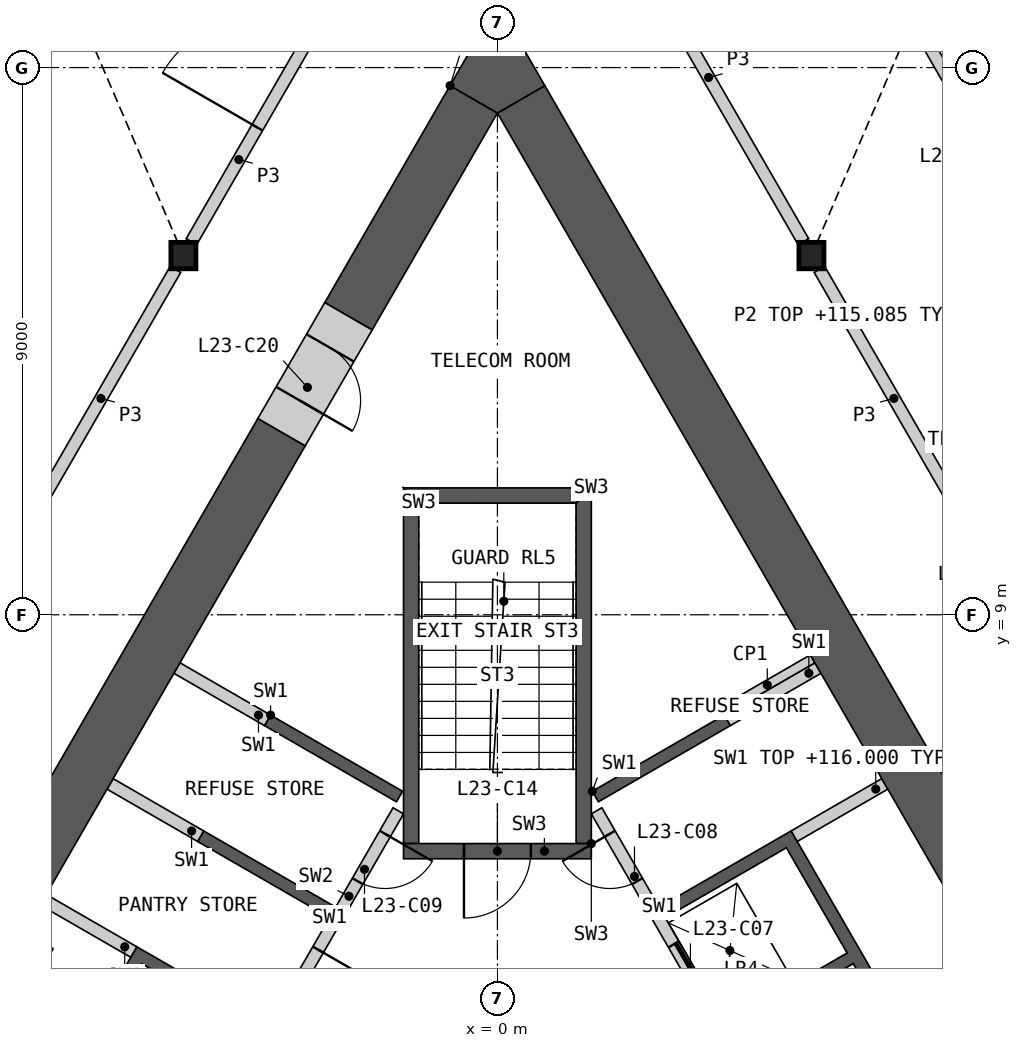
"""IFC4 building model, lengths in metres.
Left out: names, types, materials, properties, quantities, classifications, styles, units other than length and angle.
Written with IfcOpenShell. Run it as: python <this file> out.ifc"""

import sys

from ifc_helpers import new_model, si_unit, direction, frame, frame_2d, origin, origin_2d, place, context, subcontext, project, spatial, polyline, rectangle, i_section, outline, extrude, element, fill, save


model = new_model("IFC4")
c1 = context("Model", 3, precision=1e-05, world=origin(), true_north=direction((0.0, 1.0)))
c2 = subcontext(c1, "Body", "Model", "MODEL_VIEW")
j1 = project(units=[si_unit("LENGTHUNIT", "METRE"), si_unit("PLANEANGLEUNIT", "RADIAN")], contexts=[c1])
p1 = place(None, origin())
s1 = spatial("IfcSite", under=j1, at=p1, CompositionType="ELEMENT")
p2 = place(p1, origin())
s2 = spatial("IfcBuilding", under=s1, at=p2, CompositionType="ELEMENT")
p3 = place(p2, frame((0.0, 0.0, 112.2)))
s3 = spatial("IfcBuildingStorey", under=s2, at=p3, CompositionType="ELEMENT", Elevation=112.2)
for number, where, z_axis, x_axis in (
    (1, (-5.164, 14.908, 0.0), (0.0, 0.0, 1.0), (1.0, 0.0, 0.0)),
    (2, (5.164, 14.908, 0.0), (0.0, 0.0, 1.0), (1.0, 0.0, 0.0)),
):
    element("IfcColumn", number, at=place(p3, frame(where, z_axis=z_axis, x_axis=x_axis)), inside=s3, PredefinedType="COLUMN", context=c2, shape_type="SweptSolid", body=[
        extrude(i_section(OverallWidth=0.412, OverallDepth=0.435, WebThickness=0.036, FlangeThickness=0.057, at=origin_2d()), origin(), (0.0, 0.0, 1.0), 4.2),
    ])
p4 = place(p3, origin())
e3 = element("IfcWall", 3, at=p4, inside=s3, PredefinedType="SHEAR", context=c2, shape_type="SweptSolid", body=[
    extrude(outline(polyline([(1.561, 6.097), (3.731, 7.35), (3.831, 7.177), (1.66, 5.924), (1.561, 6.097)])), origin(), (0.0, 0.0, 1.0), 3.8),
])
p5 = place(p3, origin())
e4 = element("IfcWall", 4, at=p5, inside=s3, PredefinedType="SHEAR", context=c2, shape_type="SweptSolid", body=[
    extrude(outline(polyline([(2.66, 4.192), (4.831, 5.445), (8.231, -0.444), (6.061, -1.697), (5.96, -1.524), (7.952, -0.374), (6.952, 1.358), (4.96, 0.208), (4.861, 0.381), (6.852, 1.531), (5.852, 3.263), (3.861, 2.113), (3.76, 2.287), (5.752, 3.437), (4.752, 5.169), (2.76, 4.019), (2.66, 4.192)])), origin(), (0.0, 0.0, 1.0), 3.8),
])
p6 = place(p3, frame((5.817, -1.476, 0.0), z_axis=(0.0, 0.0, 1.0), x_axis=(-0.500002616675, 0.866023893041, 0.0)))
e5 = element("IfcWall", 5, at=p6, inside=s3, PredefinedType="SOLIDWALL", context=c2, shape_type="SweptSolid", body=[
    extrude(rectangle(XDim=8.373, YDim=0.2, at=frame_2d((4.187, 0.0))), origin(), (0.0, 0.0, 1.0), 3.8),
])
p7 = place(p6, frame((0.337, 0.0, 0.0)))
e6 = element("IfcOpeningElement", 6, at=p7, cuts=e5, PredefinedType="OPENING", context=c2, shape_type="SweptSolid", body=[
    extrude(rectangle(XDim=1.1, YDim=2.1, at=frame_2d((0.55, 1.05))), frame((0.0, 0.11, 0.0), z_axis=(0.0, -1.0, 0.0), x_axis=(1.0, 0.0, 0.0)), (0.0, 0.0, 1.0), 0.22),
])
p8 = place(p6, frame((2.537, 0.0, 0.0)))
e7 = element("IfcOpeningElement", 7, at=p8, cuts=e5, PredefinedType="OPENING", context=c2, shape_type="SweptSolid", body=[
    extrude(rectangle(XDim=1.1, YDim=2.1, at=frame_2d((0.55, 1.05))), frame((0.0, 0.11, 0.0), z_axis=(0.0, -1.0, 0.0), x_axis=(1.0, 0.0, 0.0)), (0.0, 0.0, 1.0), 0.22),
])
p9 = place(p6, frame((4.737, 0.0, 0.0)))
e8 = element("IfcOpeningElement", 8, at=p9, cuts=e5, PredefinedType="OPENING", context=c2, shape_type="SweptSolid", body=[
    extrude(rectangle(XDim=1.1, YDim=2.1, at=frame_2d((0.55, 1.05))), frame((0.0, 0.11, 0.0), z_axis=(0.0, -1.0, 0.0), x_axis=(1.0, 0.0, 0.0)), (0.0, 0.0, 1.0), 0.22),
])
p10 = place(p6, frame((7.037, 0.0, 0.0)))
e9 = element("IfcOpeningElement", 9, at=p10, cuts=e5, PredefinedType="OPENING", context=c2, shape_type="SweptSolid", body=[
    extrude(rectangle(XDim=0.9, YDim=2.1, at=frame_2d((0.45, 1.05))), frame((0.0, 0.11, 0.0), z_axis=(0.0, -1.0, 0.0), x_axis=(1.0, 0.0, 0.0)), (0.0, 0.0, 1.0), 0.22),
])
for number, where, z_axis, x_axis in (
    (10, (4.881, 5.358, 0.0), (0.0, 0.0, 1.0), (0.866, 0.5, 0.0)),
    (11, (3.781, 7.263, 0.0), (0.0, 0.0, 1.0), (0.866, 0.5, 0.0)),
):
    element("IfcWall", number, at=place(p3, frame(where, z_axis=z_axis, x_axis=x_axis)), inside=s3, PredefinedType="SHEAR", context=c2, shape_type="SweptSolid", body=[
        extrude(rectangle(XDim=1.72, YDim=0.2, at=frame_2d((0.86, 0.0))), origin(), (0.0, 0.0, 1.0), 3.8),
    ])
p11 = place(p3, origin())
e12 = element("IfcWall", 12, at=p11, inside=s3, PredefinedType="SHEAR", context=c2, shape_type="SweptSolid", body=[
    extrude(outline(polyline([(-4.96, 0.208), (-7.131, 1.461), (-5.931, 3.54), (-3.76, 2.287), (-3.861, 2.113), (-5.852, 3.263), (-6.852, 1.531), (-4.861, 0.381), (-4.96, 0.208)])), origin(), (0.0, 0.0, 1.0), 3.8),
])
p12 = place(p3, origin())
e13 = element("IfcWall", 13, at=p12, inside=s3, PredefinedType="SHEAR", context=c2, shape_type="SweptSolid", body=[
    extrude(outline(polyline([(-2.76, 4.019), (-4.931, 5.272), (-4.831, 5.445), (-2.66, 4.192), (-2.76, 4.019)])), origin(), (0.0, 0.0, 1.0), 3.8),
])
p13 = place(p3, origin())
e14 = element("IfcWall", 14, at=p13, inside=s3, PredefinedType="SHEAR", context=c2, shape_type="SweptSolid", body=[
    extrude(outline(polyline([(-3.731, 7.35), (-1.561, 6.097), (-1.66, 5.924), (-3.831, 7.177), (-3.731, 7.35)])), origin(), (0.0, 0.0, 1.0), 3.8),
])
p14 = place(p3, frame((-1.631, 5.776, 0.0), z_axis=(0.0, 0.0, 1.0), x_axis=(-0.499992876559, -0.866029516466, 0.0)))
e15 = element("IfcWall", 15, at=p14, inside=s3, PredefinedType="SOLIDWALL", context=c2, shape_type="SweptSolid", body=[
    extrude(rectangle(XDim=6.486, YDim=0.2, at=frame_2d((3.243, 0.0))), origin(), (0.0, 0.0, 1.0), 3.8),
])
p15 = place(p14, frame((0.437, 0.0, 0.0)))
e16 = element("IfcOpeningElement", 16, at=p15, cuts=e15, PredefinedType="OPENING", context=c2, shape_type="SweptSolid", body=[
    extrude(rectangle(XDim=0.9, YDim=2.1, at=frame_2d((0.45, 1.05))), frame((0.0, 0.11, 0.0), z_axis=(0.0, -1.0, 0.0), x_axis=(1.0, 0.0, 0.0)), (0.0, 0.0, 1.0), 0.22),
])
p16 = place(p14, frame((2.637, 0.0, 0.0)))
e17 = element("IfcOpeningElement", 17, at=p16, cuts=e15, PredefinedType="OPENING", context=c2, shape_type="SweptSolid", body=[
    extrude(rectangle(XDim=0.9, YDim=2.1, at=frame_2d((0.45, 1.05))), frame((0.0, 0.11, 0.0), z_axis=(0.0, -1.0, 0.0), x_axis=(1.0, 0.0, 0.0)), (0.0, 0.0, 1.0), 0.22),
])
for number, where, z_axis, x_axis in (
    (18, (-3.781, 7.263, 0.0), (0.0, 0.0, 1.0), (-0.866, 0.5, 0.0)),
    (19, (-4.881, 5.358, 0.0), (0.0, 0.0, 1.0), (-0.866, 0.5, 0.0)),
):
    element("IfcWall", number, at=place(p3, frame(where, z_axis=z_axis, x_axis=x_axis)), inside=s3, PredefinedType="SHEAR", context=c2, shape_type="SweptSolid", body=[
        extrude(rectangle(XDim=1.72, YDim=0.2, at=frame_2d((0.86, 0.0))), origin(), (0.0, 0.0, 1.0), 3.8),
    ])
p17 = place(p3, frame((-5.981, 3.453, 0.0), z_axis=(0.0, 0.0, 1.0), x_axis=(-0.866060346521, 0.499939472521, 0.0)))
e20 = element("IfcWall", 20, at=p17, inside=s3, PredefinedType="SHEAR", context=c2, shape_type="SweptSolid", body=[
    extrude(rectangle(XDim=1.72, YDim=0.2, at=frame_2d((0.86, 0.0))), origin(), (0.0, 0.0, 1.0), 3.8),
])
p18 = place(p3, origin())
e21 = element("IfcWall", 21, at=p18, inside=s3, PredefinedType="SHEAR", context=c2, shape_type="SweptSolid", body=[
    extrude(outline(polyline([(1.544, 5.237), (1.544, 11.087), (1.294, 10.837), (1.294, 5.237), (1.544, 5.237)])), origin(), (0.0, 0.0, 1.0), 3.8),
])
p19 = place(p3, origin())
e22 = element("IfcWall", 22, at=p19, inside=s3, PredefinedType="SHEAR", context=c2, shape_type="SweptSolid", body=[
    extrude(outline(polyline([(1.544, 11.087), (-1.544, 11.087), (-1.294, 10.837), (1.294, 10.837), (1.544, 11.087)])), origin(), (0.0, 0.0, 1.0), 3.8),
])
p20 = place(p3, origin())
e23 = element("IfcWall", 23, at=p20, inside=s3, PredefinedType="SHEAR", context=c2, shape_type="SweptSolid", body=[
    extrude(outline(polyline([(-1.294, 10.837), (-1.544, 11.087), (-1.544, 5.237), (-1.294, 5.237), (-1.294, 10.837)])), origin(), (0.0, 0.0, 1.0), 3.8),
])
p21 = place(p3, frame((1.544, 5.112, 0.0), z_axis=(0.0, 0.0, 1.0), x_axis=(-1.0, 0.0, 0.0)))
e24 = element("IfcWall", 24, at=p21, inside=s3, PredefinedType="SHEAR", context=c2, shape_type="SweptSolid", body=[
    extrude(rectangle(XDim=3.088, YDim=0.25, at=frame_2d((1.544, 0.0))), origin(), (0.0, 0.0, 1.0), 3.8),
])
p22 = place(p21, frame((0.994, 0.0, 0.0)))
e25 = element("IfcOpeningElement", 25, at=p22, cuts=e24, PredefinedType="OPENING", context=c2, shape_type="SweptSolid", body=[
    extrude(rectangle(XDim=1.1, YDim=2.1, at=frame_2d((0.55, 1.05))), frame((0.0, 0.135, 0.0), z_axis=(0.0, -1.0, 0.0), x_axis=(1.0, 0.0, 0.0)), (0.0, 0.0, 1.0), 0.27),
])
p23 = place(p3, frame((3.693, 7.415, 0.0), z_axis=(0.0, 0.0, 1.0), x_axis=(0.866024871741, 0.500000921525, 0.0)))
e26 = element("IfcWall", 26, at=p23, inside=s3, PredefinedType="PARTITIONING", context=c2, shape_type="SweptSolid", body=[
    extrude(rectangle(XDim=1.72, YDim=0.15, at=frame_2d((0.86, 0.0))), origin(), (0.0, 0.0, 1.0), 3.8),
])
p24 = place(p3, frame((7.91, 4.451, 0.0), z_axis=(0.0, 0.0, 1.0), x_axis=(-0.500005799286, 0.866022055539, 0.0)))
e27 = element("IfcWall", 27, at=p24, inside=s3, PredefinedType="SHEAR", context=c2, shape_type="SweptSolid", body=[
    extrude(rectangle(XDim=15.041, YDim=0.9, at=frame_2d((7.521, 0.0))), origin(), (0.0, 0.0, 1.0), 3.8),
])
p25 = place(p3, frame((-3.55, 12.004, 0.0), z_axis=(0.0, 0.0, 1.0), x_axis=(-0.499993245289, -0.866029303583, 0.0)))
e28 = element("IfcWall", 28, at=p25, inside=s3, PredefinedType="SHEAR", context=c2, shape_type="SweptSolid", body=[
    extrude(rectangle(XDim=8.741, YDim=0.9, at=frame_2d((4.37, 0.0))), origin(), (0.0, 0.0, 1.0), 3.8),
])
p26 = place(p3, frame((-0.39, 17.478, 0.0), z_axis=(0.0, 0.0, 1.0), x_axis=(-0.50001992892, -0.866013897511, 0.0)))
e29 = element("IfcWall", 29, at=p26, inside=s3, PredefinedType="SHEAR", context=c2, shape_type="SweptSolid", body=[
    extrude(rectangle(XDim=4.12, YDim=0.9, at=frame_2d((2.06, 0.0))), origin(), (0.0, 0.0, 1.0), 3.8),
])
p27 = place(p3, origin())
e30 = element("IfcWall", 30, at=p27, inside=s3, PredefinedType="SHEAR", context=c2, shape_type="SweptSolid", body=[
    extrude(outline(polyline([(-0.779, 17.703), (0.0, 19.052), (0.779, 17.703), (0.0, 17.253), (-0.779, 17.703)])), origin(), (0.0, 0.0, 1.0), 3.8),
])
p28 = place(p3, frame((-2.45, 13.909, 0.0), z_axis=(0.0, 0.0, 1.0), x_axis=(-0.50002983664, -0.866008176907, 0.0)))
e31 = element("IfcWall", 31, at=p28, inside=s3, PredefinedType="SHEAR", context=c2, shape_type="SweptSolid", body=[
    extrude(rectangle(XDim=2.2, YDim=0.9, at=frame_2d((1.1, 0.0))), origin(), (0.0, 0.0, 1.0), 3.8),
])
p29 = place(p28, frame((0.6, 0.0, 0.0)))
e32 = element("IfcOpeningElement", 32, at=p29, cuts=e31, PredefinedType="OPENING", context=c2, shape_type="SweptSolid", body=[
    extrude(rectangle(XDim=1.0, YDim=2.1, at=frame_2d((0.5, 1.05))), frame((0.0, 0.46, 0.0), z_axis=(0.0, -1.0, 0.0), x_axis=(1.0, 0.0, 0.0)), (0.0, 0.0, 1.0), 0.92),
])
p30 = place(p3, frame((-10.197, 6.19, 0.0), z_axis=(0.0, 0.0, 1.0), x_axis=(0.500012035596, 0.866018454918, 0.0)))
e33 = element("IfcWall", 33, at=p30, inside=s3, PredefinedType="PARTITIONING", context=c2, shape_type="SweptSolid", body=[
    extrude(rectangle(XDim=9.803, YDim=0.2, at=frame_2d((4.902, 0.0))), origin(), (0.0, 0.0, 1.0), 3.8),
])
p31 = place(p30, frame((1.851, 0.0, 0.0)))
e34 = element("IfcOpeningElement", 34, at=p31, cuts=e33, PredefinedType="OPENING", context=c2, shape_type="SweptSolid", body=[
    extrude(rectangle(XDim=1.0, YDim=2.1, at=frame_2d((0.5, 1.05))), frame((0.0, 0.11, 0.0), z_axis=(0.0, -1.0, 0.0), x_axis=(1.0, 0.0, 0.0)), (0.0, 0.0, 1.0), 0.22),
])
p32 = place(p3, frame((5.295, 14.68, 0.0), z_axis=(0.0, 0.0, 1.0), x_axis=(0.500012035596, -0.866018454918, 0.0)))
e35 = element("IfcWall", 35, at=p32, inside=s3, PredefinedType="PARTITIONING", context=c2, shape_type="SweptSolid", body=[
    extrude(rectangle(XDim=9.803, YDim=0.2, at=frame_2d((4.902, 0.0))), origin(), (0.0, 0.0, 1.0), 3.8),
])
p33 = place(p32, frame((4.376, 0.0, 0.0)))
e36 = element("IfcOpeningElement", 36, at=p33, cuts=e35, PredefinedType="OPENING", context=c2, shape_type="SweptSolid", body=[
    extrude(rectangle(XDim=0.95, YDim=2.1, at=frame_2d((0.475, 1.05))), frame((0.0, 0.11, 0.0), z_axis=(0.0, -1.0, 0.0), x_axis=(1.0, 0.0, 0.0)), (0.0, 0.0, 1.0), 0.22),
])
p34 = place(p3, frame((-5.033, 15.135, 0.0), z_axis=(0.0, 0.0, 1.0), x_axis=(0.499980978912, 0.866036385336, 0.0)))
e37 = element("IfcWall", 37, at=p34, inside=s3, PredefinedType="PARTITIONING", context=c2, shape_type="SweptSolid", body=[
    extrude(rectangle(XDim=6.24, YDim=0.2, at=frame_2d((3.12, 0.0))), origin(), (0.0, 0.0, 1.0), 3.8),
])
p35 = place(p34, frame((2.169, 0.0, 0.0)))
e38 = element("IfcOpeningElement", 38, at=p35, cuts=e37, PredefinedType="OPENING", context=c2, shape_type="SweptSolid", body=[
    extrude(rectangle(XDim=1.8, YDim=2.1, at=frame_2d((0.9, 1.05))), frame((0.0, 0.11, 0.0), z_axis=(0.0, -1.0, 0.0), x_axis=(1.0, 0.0, 0.0)), (0.0, 0.0, 1.0), 0.22),
])
p36 = place(p3, frame((1.913, 20.539, 0.0), z_axis=(0.0, 0.0, 1.0), x_axis=(0.499980978912, -0.866036385336, 0.0)))
e39 = element("IfcWall", 39, at=p36, inside=s3, PredefinedType="PARTITIONING", context=c2, shape_type="SweptSolid", body=[
    extrude(rectangle(XDim=6.24, YDim=0.2, at=frame_2d((3.12, 0.0))), origin(), (0.0, 0.0, 1.0), 3.8),
])
p37 = place(p3, frame((4.548, 22.775, 0.0), z_axis=(0.0, 0.0, 1.0), x_axis=(0.499999764473, -0.866025539766, 0.0)))
e40 = element("IfcWall", 40, at=p37, inside=s3, PredefinedType="PARTITIONING", context=c2, shape_type="SweptSolid", body=[
    extrude(rectangle(XDim=17.35, YDim=0.2, at=frame_2d((8.675, 0.0))), origin(), (0.0, 0.0, 1.0), 2.885),
])
p38 = place(p37, frame((7.65, 0.0, 0.0)))
e41 = element("IfcOpeningElement", 41, at=p38, cuts=e40, PredefinedType="OPENING", context=c2, shape_type="SweptSolid", body=[
    extrude(rectangle(XDim=0.95, YDim=2.1, at=frame_2d((0.475, 1.05))), frame((0.0, 0.11, 0.0), z_axis=(0.0, -1.0, 0.0), x_axis=(1.0, 0.0, 0.0)), (0.0, 0.0, 1.0), 0.22),
])
p39 = place(p9, origin())
e42 = element("IfcDoor", 42, at=p39, inside=s3, OperationType="SLIDING_TO_LEFT", PredefinedType="DOOR", context=c2, shape_type="SweptSolid", body=[
    extrude(rectangle(XDim=1.1, YDim=2.1, at=frame_2d((0.55, 1.05))), frame((0.0, 0.025, 0.0), z_axis=(0.0, -1.0, 0.0), x_axis=(1.0, 0.0, 0.0)), (0.0, 0.0, 1.0), 0.05),
])
fill(e8, e42)
p40 = place(p10, origin())
e43 = element("IfcDoor", 43, at=p40, inside=s3, OperationType="SINGLE_SWING_RIGHT", PredefinedType="DOOR", context=c2, shape_type="SweptSolid", body=[
    extrude(rectangle(XDim=0.9, YDim=2.1, at=frame_2d((0.45, 1.05))), frame((0.0, 0.025, 0.0), z_axis=(0.0, -1.0, 0.0), x_axis=(1.0, 0.0, 0.0)), (0.0, 0.0, 1.0), 0.05),
])
fill(e9, e43)
p41 = place(p15, origin())
e44 = element("IfcDoor", 44, at=p41, inside=s3, OperationType="SINGLE_SWING_LEFT", PredefinedType="DOOR", context=c2, shape_type="SweptSolid", body=[
    extrude(rectangle(XDim=0.9, YDim=2.1, at=frame_2d((0.45, 1.05))), frame((0.0, 0.025, 0.0), z_axis=(0.0, -1.0, 0.0), x_axis=(1.0, 0.0, 0.0)), (0.0, 0.0, 1.0), 0.05),
])
fill(e16, e44)
p42 = place(p16, origin())
e45 = element("IfcDoor", 45, at=p42, inside=s3, OperationType="SINGLE_SWING_LEFT", PredefinedType="DOOR", context=c2, shape_type="SweptSolid", body=[
    extrude(rectangle(XDim=0.9, YDim=2.1, at=frame_2d((0.45, 1.05))), frame((0.0, 0.025, 0.0), z_axis=(0.0, -1.0, 0.0), x_axis=(1.0, 0.0, 0.0)), (0.0, 0.0, 1.0), 0.05),
])
fill(e17, e45)
p43 = place(p22, origin())
e46 = element("IfcDoor", 46, at=p43, inside=s3, OperationType="SINGLE_SWING_RIGHT", PredefinedType="DOOR", context=c2, shape_type="SweptSolid", body=[
    extrude(rectangle(XDim=1.1, YDim=2.1, at=frame_2d((0.55, 1.05))), frame((0.0, 0.025, 0.0), z_axis=(0.0, -1.0, 0.0), x_axis=(1.0, 0.0, 0.0)), (0.0, 0.0, 1.0), 0.05),
])
fill(e25, e46)
p44 = place(p29, origin())
e47 = element("IfcDoor", 47, at=p44, inside=s3, OperationType="SINGLE_SWING_RIGHT", PredefinedType="DOOR", context=c2, shape_type="SweptSolid", body=[
    extrude(rectangle(XDim=1.0, YDim=2.1, at=frame_2d((0.5, 1.05))), frame((0.0, 0.205, 0.0), z_axis=(0.0, -1.0, 0.0), x_axis=(1.0, 0.0, 0.0)), (0.0, 0.0, 1.0), 0.05),
])
fill(e32, e47)
p45 = place(p35, origin())
e48 = element("IfcDoor", 48, at=p45, inside=s3, OperationType="DOUBLE_DOOR_SINGLE_SWING", PredefinedType="DOOR", context=c2, shape_type="SweptSolid", body=[
    extrude(rectangle(XDim=1.8, YDim=2.1, at=frame_2d((0.9, 1.05))), frame((0.0, 0.025, 0.0), z_axis=(0.0, -1.0, 0.0), x_axis=(1.0, 0.0, 0.0)), (0.0, 0.0, 1.0), 0.05),
])
fill(e38, e48)
save(model, sys.argv[1])
